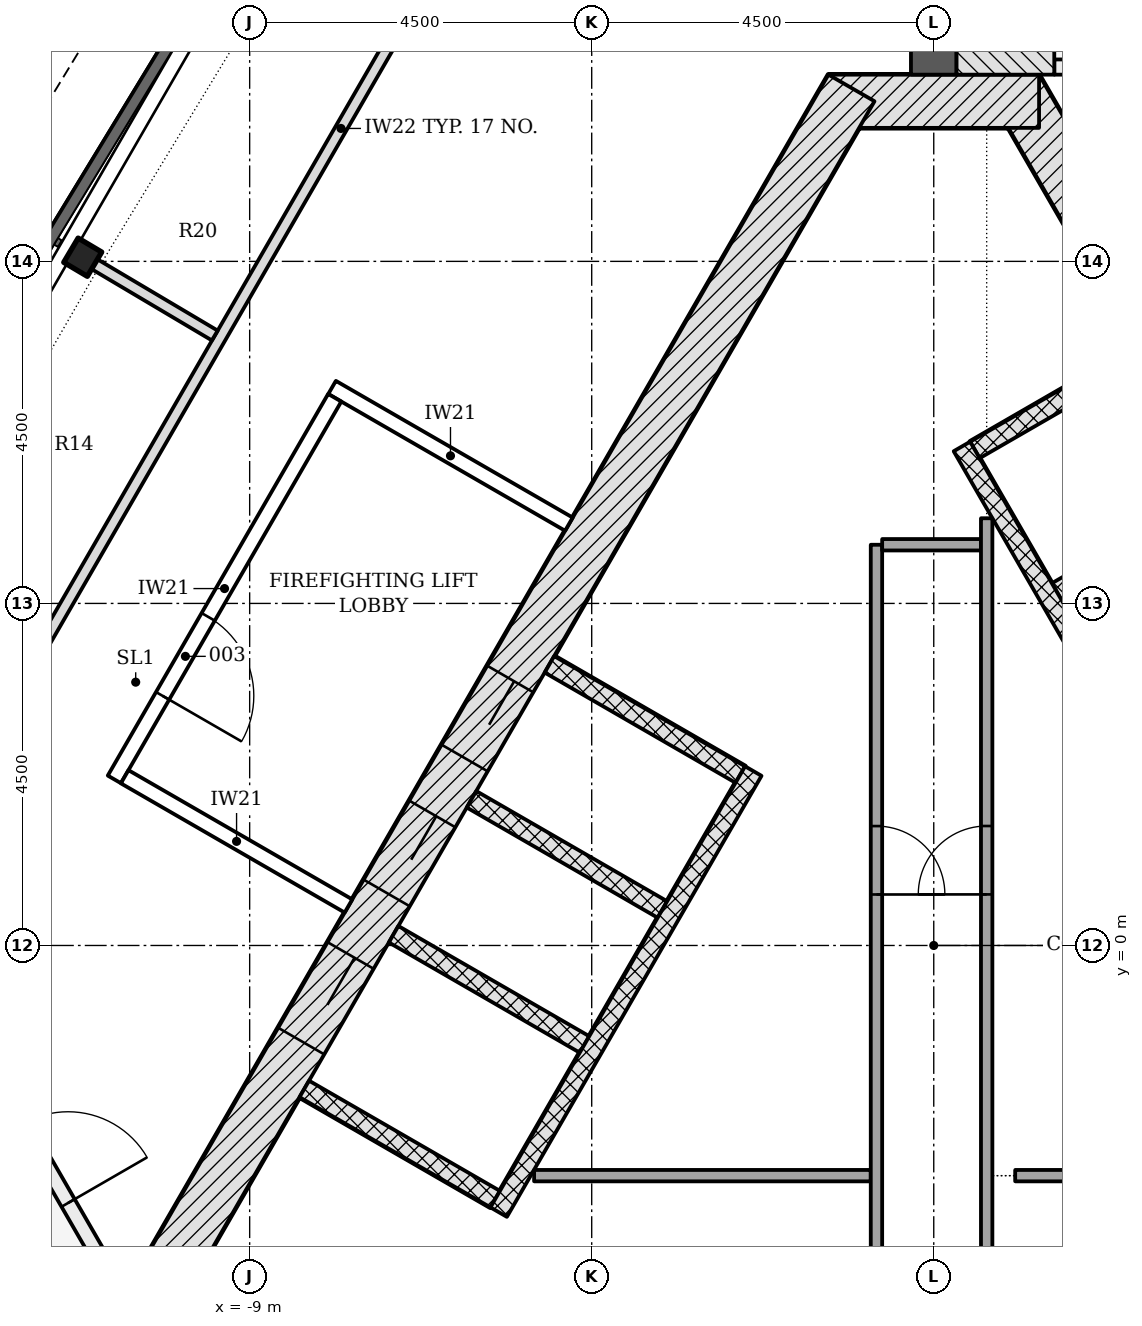
"""IFC4 building model, lengths in metres.
Left out: names, types, materials, properties, quantities, classifications, styles, units other than length and angle.
Written with IfcOpenShell. Run it as: python <this file> out.ifc"""

import sys

from ifc_helpers import new_model, si_unit, direction, frame, frame_2d, origin, origin_2d, place, context, subcontext, project, spatial, polyline, rectangle, i_section, outline, extrude, element, fill, save


model = new_model("IFC4")
c1 = context("Model", 3, precision=1e-05, world=origin(), true_north=direction((0.0, 1.0)))
c2 = subcontext(c1, "Body", "Model", "MODEL_VIEW")
j1 = project(units=[si_unit("LENGTHUNIT", "METRE"), si_unit("PLANEANGLEUNIT", "RADIAN")], contexts=[c1])
p1 = place(None, origin())
s1 = spatial("IfcSite", under=j1, at=p1, CompositionType="ELEMENT")
p2 = place(p1, origin())
s2 = spatial("IfcBuilding", under=s1, at=p2, CompositionType="ELEMENT")
p3 = place(p2, frame((0.0, 0.0, 274.2)))
s3 = spatial("IfcBuildingStorey", under=s2, at=p3, CompositionType="ELEMENT", Elevation=274.2)
p4 = place(p3, frame((10.311, -4.703, -0.2), z_axis=(0.0, 0.0, 1.0), x_axis=(-0.500001446645, 0.866024568562, 0.0)))
e1 = element("IfcWall", 1, at=p4, inside=s3, PredefinedType="SHEAR", context=c2, shape_type="SweptSolid", body=[
    extrude(rectangle(XDim=18.458, YDim=0.7, at=frame_2d((9.229, 0.0))), origin(), (0.0, 0.0, 1.0), 5.35),
])
p5 = place(p4, frame((4.379, 0.0, 0.2)))
e2 = element("IfcOpeningElement", 2, at=p5, cuts=e1, PredefinedType="OPENING", context=c2, shape_type="SweptSolid", body=[
    extrude(rectangle(XDim=1.1, YDim=2.1, at=frame_2d((0.55, 1.05))), frame((0.0, 0.36, 0.0), z_axis=(0.0, -1.0, 0.0), x_axis=(1.0, 0.0, 0.0)), (0.0, 0.0, 1.0), 0.72),
])
p6 = place(p4, frame((6.529, 0.0, 0.2)))
e3 = element("IfcOpeningElement", 3, at=p6, cuts=e1, PredefinedType="OPENING", context=c2, shape_type="SweptSolid", body=[
    extrude(rectangle(XDim=1.1, YDim=2.1, at=frame_2d((0.55, 1.05))), frame((0.0, 0.36, 0.0), z_axis=(0.0, -1.0, 0.0), x_axis=(1.0, 0.0, 0.0)), (0.0, 0.0, 1.0), 0.72),
])
p7 = place(p4, frame((8.679, 0.0, 0.2)))
e4 = element("IfcOpeningElement", 4, at=p7, cuts=e1, PredefinedType="OPENING", context=c2, shape_type="SweptSolid", body=[
    extrude(rectangle(XDim=1.1, YDim=2.1, at=frame_2d((0.55, 1.05))), frame((0.0, 0.36, 0.0), z_axis=(0.0, -1.0, 0.0), x_axis=(1.0, 0.0, 0.0)), (0.0, 0.0, 1.0), 0.72),
])
p8 = place(p4, frame((10.829, 0.0, 0.2)))
e5 = element("IfcOpeningElement", 5, at=p8, cuts=e1, PredefinedType="OPENING", context=c2, shape_type="SweptSolid", body=[
    extrude(rectangle(XDim=1.1, YDim=2.1, at=frame_2d((0.55, 1.05))), frame((0.0, 0.36, 0.0), z_axis=(0.0, -1.0, 0.0), x_axis=(1.0, 0.0, 0.0)), (0.0, 0.0, 1.0), 0.72),
])
p9 = place(p4, frame((12.979, 0.0, 0.2)))
e6 = element("IfcOpeningElement", 6, at=p9, cuts=e1, PredefinedType="OPENING", context=c2, shape_type="SweptSolid", body=[
    extrude(rectangle(XDim=1.1, YDim=2.1, at=frame_2d((0.55, 1.05))), frame((0.0, 0.36, 0.0), z_axis=(0.0, -1.0, 0.0), x_axis=(1.0, 0.0, 0.0)), (0.0, 0.0, 1.0), 0.72),
])
p10 = place(p3, frame((1.386, 11.106, -0.2), z_axis=(0.0, 0.0, 1.0), x_axis=(-1.0, 0.0, 0.0)))
e7 = element("IfcWall", 7, at=p10, inside=s3, PredefinedType="SHEAR", context=c2, shape_type="SweptSolid", body=[
    extrude(rectangle(XDim=2.771, YDim=0.7, at=frame_2d((1.386, 0.0))), origin(), (0.0, 0.0, 1.0), 5.35),
])
p11 = place(p3, frame((-1.083, 11.281, -0.2), z_axis=(0.0, 0.0, 1.0), x_axis=(-0.500001446645, -0.866024568562, 0.0)))
e8 = element("IfcWall", 8, at=p11, inside=s3, PredefinedType="SHEAR", context=c2, shape_type="SweptSolid", body=[
    extrude(rectangle(XDim=18.458, YDim=0.7, at=frame_2d((9.229, 0.0))), origin(), (0.0, 0.0, 1.0), 5.35),
])
p12 = place(p11, frame((8.979, 0.0, 0.2)))
e9 = element("IfcOpeningElement", 9, at=p12, cuts=e8, PredefinedType="OPENING", context=c2, shape_type="SweptSolid", body=[
    extrude(rectangle(XDim=1.2, YDim=2.1, at=frame_2d((0.6, 1.05))), frame((0.0, 0.36, 0.0), z_axis=(0.0, -1.0, 0.0), x_axis=(1.0, 0.0, 0.0)), (0.0, 0.0, 1.0), 0.72),
])
p13 = place(p11, frame((11.029, 0.0, 0.2)))
e10 = element("IfcOpeningElement", 10, at=p13, cuts=e8, PredefinedType="OPENING", context=c2, shape_type="SweptSolid", body=[
    extrude(rectangle(XDim=1.2, YDim=2.1, at=frame_2d((0.6, 1.05))), frame((0.0, 0.36, 0.0), z_axis=(0.0, -1.0, 0.0), x_axis=(1.0, 0.0, 0.0)), (0.0, 0.0, 1.0), 0.72),
])
p14 = place(p11, frame((13.179, 0.0, 0.2)))
e11 = element("IfcOpeningElement", 11, at=p14, cuts=e8, PredefinedType="OPENING", context=c2, shape_type="SweptSolid", body=[
    extrude(rectangle(XDim=1.3, YDim=2.1, at=frame_2d((0.65, 1.05))), frame((0.0, 0.36, 0.0), z_axis=(0.0, -1.0, 0.0), x_axis=(1.0, 0.0, 0.0)), (0.0, 0.0, 1.0), 0.72),
])
p15 = place(p3, frame((0.0, 11.456, -0.2), z_axis=(0.0, 0.0, 1.0), x_axis=(0.0, 1.0, 0.0)))
e12 = element("IfcWall", 12, at=p15, inside=s3, PredefinedType="SHEAR", context=c2, shape_type="SweptSolid", body=[
    extrude(rectangle(XDim=6.679, YDim=0.6, at=frame_2d((3.339, 0.0))), origin(), (0.0, 0.0, 1.0), 5.35),
])
p16 = place(p3, frame((-11.196, 9.055, -0.2), z_axis=(0.0, 0.0, 1.0), x_axis=(-0.51000874803, -0.860169214127, 0.0)))
e13 = element("IfcColumn", 13, at=p16, inside=s3, PredefinedType="COLUMN", context=c2, shape_type="SweptSolid", body=[
    extrude(i_section(OverallWidth=0.371, OverallDepth=0.361, WebThickness=0.012, FlangeThickness=0.02, FilletRadius=0.015, at=origin_2d()), origin(), (0.0, 0.0, 1.0), 5.35),
])
p17 = place(p3, origin())
e14 = element("IfcWall", 14, at=p17, inside=s3, PredefinedType="NOTDEFINED", context=c2, shape_type="SweptSolid", body=[
    extrude(outline(polyline([(-18.145, -2.507), (-19.021, -4.273), (-19.538, -5.703), (-19.733, -7.21), (-19.599, -8.724), (-19.141, -10.174), (-18.381, -11.49), (-17.355, -12.611), (-16.111, -13.485), (-14.708, -14.069), (-13.211, -14.336), (-11.244, -14.46), (-11.225, -14.161), (-13.176, -14.038), (-14.623, -13.779), (-15.965, -13.22), (-17.156, -12.385), (-18.138, -11.312), (-18.865, -10.052), (-19.303, -8.665), (-19.432, -7.216), (-19.244, -5.774), (-18.745, -4.391), (-17.876, -2.64), (-18.145, -2.507)])), origin(), (0.0, 0.0, 1.0), 5.15),
])
p18 = place(p3, origin())
e15 = element("IfcWall", 15, at=p18, inside=s3, PredefinedType="PARAPET", context=c2, shape_type="SweptSolid", body=[
    extrude(outline(polyline([(-5.81, 18.61), (-8.585, 20.051), (-11.451, 21.107), (-14.298, 21.739), (-17.016, 21.922), (-19.5, 21.648), (-21.656, 20.929), (-23.4, 19.792), (-24.665, 18.28), (-25.403, 16.452), (-25.585, 14.378), (-25.205, 12.137), (-24.277, 9.817), (-22.836, 7.505), (-20.938, 5.291), (-18.656, 3.26), (-16.078, 1.49), (-15.937, 1.696), (-18.502, 3.457), (-20.759, 5.467), (-22.634, 7.653), (-24.053, 9.93), (-24.963, 12.205), (-25.333, 14.388), (-25.157, 16.393), (-24.448, 18.15), (-23.232, 19.603), (-21.546, 20.702), (-19.446, 21.403), (-17.01, 21.671), (-14.334, 21.491), (-11.522, 20.867), (-8.687, 19.822), (-5.925, 18.388), (-5.81, 18.61)])), origin(), (0.0, 0.0, 1.0), 1.1),
])
for number, where, z_axis, x_axis in (
    (16, (3.781, 5.907, -0.2), (0.0, 0.0, 1.0), (-0.866, -0.5, 0.0)),
    (17, (2.706, 7.769, -0.2), (0.0, 0.0, 1.0), (-0.866, -0.5, 0.0)),
):
    element("IfcWall", number, at=place(p3, frame(where, z_axis=z_axis, x_axis=x_axis)), inside=s3, PredefinedType="PARTITIONING", context=c2, shape_type="SweptSolid", body=[
        extrude(rectangle(XDim=2.5, YDim=0.25, at=frame_2d((1.25, 0.0))), origin(), (0.0, 0.0, 1.0), 5.35),
    ])
p19 = place(p3, frame((5.87, -2.961, 0.0), z_axis=(0.0, 0.0, 1.0), x_axis=(-0.50000615651, 0.866021849293, 0.0)))
e18 = element("IfcWall", 18, at=p19, inside=s3, PredefinedType="PARTITIONING", context=c2, shape_type="SweptSolid", body=[
    extrude(rectangle(XDim=11.0, YDim=0.25, at=frame_2d((5.5, 0.0))), origin(), (0.0, 0.0, 1.0), 5.15),
])
for number, where, z_axis, x_axis in (
    (19, (-5.056, 3.699, -0.2), (0.0, 0.0, 1.0), (0.866, -0.5, 0.0)),
    (20, (-6.081, 1.923, -0.2), (0.0, 0.0, 1.0), (0.866, -0.5, 0.0)),
    (21, (-7.106, 0.148, -0.2), (0.0, 0.0, 1.0), (0.866, -0.5, 0.0)),
    (22, (-8.281, -1.887, -0.2), (0.0, 0.0, 1.0), (0.866, -0.5, 0.0)),
):
    element("IfcWall", number, at=place(p3, frame(where, z_axis=z_axis, x_axis=x_axis)), inside=s3, PredefinedType="PARTITIONING", context=c2, shape_type="SweptSolid", body=[
        extrude(rectangle(XDim=2.9, YDim=0.25, at=frame_2d((1.45, 0.0))), origin(), (0.0, 0.0, 1.0), 5.35),
    ])
p20 = place(p3, frame((-2.374, 2.294, 0.0), z_axis=(0.0, 0.0, 1.0), x_axis=(-0.500003174267, -0.866023571113, 0.0)))
e23 = element("IfcWall", 23, at=p20, inside=s3, PredefinedType="PARTITIONING", context=c2, shape_type="SweptSolid", body=[
    extrude(rectangle(XDim=6.7, YDim=0.25, at=frame_2d((3.35, 0.0))), origin(), (0.0, 0.0, 1.0), 5.15),
])
p21 = place(p3, frame((-5.258, -3.028, 0.0), z_axis=(0.0, 0.0, 1.0), x_axis=(1.0, 0.0, 0.0)))
e24 = element("IfcWall", 24, at=p21, inside=s3, PredefinedType="PARTITIONING", context=c2, shape_type="SweptSolid", body=[
    extrude(rectangle(XDim=4.429, YDim=0.15, at=frame_2d((2.215, 0.0))), origin(), (0.0, 0.0, 1.0), 5.15),
])
p22 = place(p3, frame((-0.754, 5.272, 0.0), z_axis=(0.0, 0.0, 1.0), x_axis=(0.0, -1.0, 0.0)))
e25 = element("IfcWall", 25, at=p22, inside=s3, PredefinedType="PARTITIONING", context=c2, shape_type="SweptSolid", body=[
    extrude(rectangle(XDim=11.5, YDim=0.15, at=frame_2d((5.75, 0.0))), origin(), (0.0, 0.0, 1.0), 5.15),
])
p23 = place(p22, frame((3.701, 0.0, 0.0)))
e26 = element("IfcOpeningElement", 26, at=p23, cuts=e25, PredefinedType="OPENING", context=c2, shape_type="SweptSolid", body=[
    extrude(rectangle(XDim=0.9, YDim=2.1, at=frame_2d((0.45, 1.05))), frame((0.0, 0.085, 0.0), z_axis=(0.0, -1.0, 0.0), x_axis=(1.0, 0.0, 0.0)), (0.0, 0.0, 1.0), 0.17),
])
p24 = place(p3, frame((-0.679, 5.272, 0.0), z_axis=(0.0, 0.0, 1.0), x_axis=(1.0, 0.0, 0.0)))
e27 = element("IfcWall", 27, at=p24, inside=s3, PredefinedType="PARTITIONING", context=c2, shape_type="SweptSolid", body=[
    extrude(rectangle(XDim=1.3, YDim=0.15, at=frame_2d((0.65, 0.0))), origin(), (0.0, 0.0, 1.0), 5.15),
])
p25 = place(p3, frame((0.696, -5.928, 0.0), z_axis=(0.0, 0.0, 1.0), x_axis=(0.0, 1.0, 0.0)))
e28 = element("IfcWall", 28, at=p25, inside=s3, PredefinedType="PARTITIONING", context=c2, shape_type="SweptSolid", body=[
    extrude(rectangle(XDim=11.549, YDim=0.15, at=frame_2d((5.774, 0.0))), origin(), (0.0, 0.0, 1.0), 5.15),
])
p26 = place(p25, frame((6.6, 0.0, 0.0)))
e29 = element("IfcOpeningElement", 29, at=p26, cuts=e28, PredefinedType="OPENING", context=c2, shape_type="SweptSolid", body=[
    extrude(rectangle(XDim=0.9, YDim=2.1, at=frame_2d((0.45, 1.05))), frame((0.0, 0.085, 0.0), z_axis=(0.0, -1.0, 0.0), x_axis=(1.0, 0.0, 0.0)), (0.0, 0.0, 1.0), 0.17),
])
p27 = place(p3, frame((1.071, -3.028, 0.0), z_axis=(0.0, 0.0, 1.0), x_axis=(1.0, 0.0, 0.0)))
e30 = element("IfcWall", 30, at=p27, inside=s3, PredefinedType="PARTITIONING", context=c2, shape_type="SweptSolid", body=[
    extrude(rectangle(XDim=7.569, YDim=0.15, at=frame_2d((3.784, 0.0))), origin(), (0.0, 0.0, 1.0), 5.15),
])
p28 = place(p3, frame((5.135, 11.556, -0.2), z_axis=(0.0, 0.0, 1.0), x_axis=(-1.0, 0.0, 0.0)))
e31 = element("IfcWall", 31, at=p28, inside=s3, PredefinedType="SHEAR", context=c2, shape_type="SweptSolid", body=[
    extrude(rectangle(XDim=3.55, YDim=0.2, at=frame_2d((1.775, 0.0))), origin(), (0.0, 0.0, 1.0), 5.35),
])
p29 = place(p28, frame((1.175, 0.0, 0.2)))
e32 = element("IfcOpeningElement", 32, at=p29, cuts=e31, PredefinedType="OPENING", context=c2, shape_type="SweptSolid", body=[
    extrude(rectangle(XDim=1.2, YDim=2.1, at=frame_2d((0.6, 1.05))), frame((0.0, 0.11, 0.0), z_axis=(0.0, -1.0, 0.0), x_axis=(1.0, 0.0, 0.0)), (0.0, 0.0, 1.0), 0.22),
])
p30 = place(p3, frame((0.943, 11.456, -0.2), z_axis=(0.0, 0.0, 1.0), x_axis=(0.0, 1.0, 0.0)))
e33 = element("IfcWall", 33, at=p30, inside=s3, PredefinedType="SHEAR", context=c2, shape_type="SweptSolid", body=[
    extrude(rectangle(XDim=6.679, YDim=1.286, at=frame_2d((3.339, 0.0))), origin(), (0.0, 0.0, 1.0), 5.35),
])
p31 = place(p3, frame((-12.576, -1.331, -0.2), z_axis=(0.0, 0.0, 1.0), x_axis=(0.499970499736, -0.8660424351, 0.0)))
e34 = element("IfcWall", 34, at=p31, inside=s3, PredefinedType="SHEAR", context=c2, shape_type="SweptSolid", body=[
    extrude(rectangle(XDim=3.55, YDim=0.2, at=frame_2d((1.775, 0.0))), origin(), (0.0, 0.0, 1.0), 5.35),
])
p32 = place(p31, frame((1.175, 0.0, 0.2)))
e35 = element("IfcOpeningElement", 35, at=p32, cuts=e34, PredefinedType="OPENING", context=c2, shape_type="SweptSolid", body=[
    extrude(rectangle(XDim=1.2, YDim=2.1, at=frame_2d((0.6, 1.05))), frame((0.0, 0.11, 0.0), z_axis=(0.0, -1.0, 0.0), x_axis=(1.0, 0.0, 0.0)), (0.0, 0.0, 1.0), 0.22),
])
p33 = place(p3, frame((-4.8, 5.542, 0.0), z_axis=(0.0, 0.0, 1.0), x_axis=(-0.866017220491, 0.500014173611, 0.0)))
e36 = element("IfcWall", 36, at=p33, inside=s3, PredefinedType="PARTITIONING", context=c2, shape_type="SweptSolid", body=[
    extrude(rectangle(XDim=3.598, YDim=0.2, at=frame_2d((1.799, 0.0))), origin(), (0.0, 0.0, 1.0), 5.15),
])
p34 = place(p3, frame((-7.881, 7.206, 0.0), z_axis=(0.0, 0.0, 1.0), x_axis=(-0.499988536525, -0.866032022124, 0.0)))
e37 = element("IfcWall", 37, at=p34, inside=s3, PredefinedType="PARTITIONING", context=c2, shape_type="SweptSolid", body=[
    extrude(rectangle(XDim=5.798, YDim=0.2, at=frame_2d((2.899, 0.0))), origin(), (0.0, 0.0, 1.0), 4.602),
])
p35 = place(p34, frame((3.329, 0.0, 0.0)))
e38 = element("IfcOpeningElement", 38, at=p35, cuts=e37, PredefinedType="OPENING", context=c2, shape_type="SweptSolid", body=[
    extrude(rectangle(XDim=1.2, YDim=2.1, at=frame_2d((0.6, 1.05))), frame((0.0, 0.11, 0.0), z_axis=(0.0, -1.0, 0.0), x_axis=(1.0, 0.0, 0.0)), (0.0, 0.0, 1.0), 0.22),
])
p36 = place(p3, frame((-10.645, 2.219, 0.0), z_axis=(0.0, 0.0, 1.0), x_axis=(0.866038511948, -0.499977295307, 0.0)))
e39 = element("IfcWall", 39, at=p36, inside=s3, PredefinedType="PARTITIONING", context=c2, shape_type="SweptSolid", body=[
    extrude(rectangle(XDim=3.4, YDim=0.2, at=frame_2d((1.7, 0.0))), origin(), (0.0, 0.0, 1.0), 5.15),
])
p37 = place(p3, frame((-13.457, 0.949, 0.0), z_axis=(0.0, 0.0, 1.0), x_axis=(0.500001340499, 0.866024629845, 0.0)))
e40 = element("IfcWall", 40, at=p37, inside=s3, PredefinedType="PARTITIONING", context=c2, shape_type="SweptSolid", body=[
    extrude(rectangle(XDim=22.632, YDim=0.15, at=frame_2d((11.316, 0.0))), origin(), (0.0, 0.0, 1.0), 4.602),
])
p38 = place(p37, frame((14.943, 0.0, 0.0)))
e41 = element("IfcOpeningElement", 41, at=p38, cuts=e40, PredefinedType="OPENING", context=c2, shape_type="SweptSolid", body=[
    extrude(rectangle(XDim=1.0, YDim=2.1, at=frame_2d((0.5, 1.05))), frame((0.0, 0.085, 0.0), z_axis=(0.0, -1.0, 0.0), x_axis=(1.0, 0.0, 0.0)), (0.0, 0.0, 1.0), 0.17),
])
p39 = place(p37, frame((0.329, 0.0, 0.0)))
e42 = element("IfcOpeningElement", 42, at=p39, cuts=e40, PredefinedType="OPENING", context=c2, shape_type="SweptSolid", body=[
    extrude(rectangle(XDim=1.0, YDim=2.1, at=frame_2d((0.5, 1.05))), frame((0.0, 0.085, 0.0), z_axis=(0.0, -1.0, 0.0), x_axis=(1.0, 0.0, 0.0)), (0.0, 0.0, 1.0), 0.17),
])
p40 = place(p3, frame((-11.046, 8.966, 0.0), z_axis=(0.0, 0.0, 1.0), x_axis=(0.860132404911, -0.510070824516, 0.0)))
e43 = element("IfcWall", 43, at=p40, inside=s3, PredefinedType="PARTITIONING", context=c2, shape_type="SweptSolid", body=[
    extrude(rectangle(XDim=1.845, YDim=0.15, at=frame_2d((0.922, 0.0))), origin(), (0.0, 0.0, 1.0), 4.602),
])
p41 = place(p12, origin())
e44 = element("IfcDoor", 44, at=p41, inside=s3, OperationType="DOUBLE_DOOR_SLIDING", PredefinedType="DOOR", context=c2, shape_type="SweptSolid", body=[
    extrude(rectangle(XDim=1.2, YDim=2.1, at=frame_2d((0.6, 1.05))), frame((0.0, 0.025, 0.0), z_axis=(0.0, -1.0, 0.0), x_axis=(1.0, 0.0, 0.0)), (0.0, 0.0, 1.0), 0.05),
])
fill(e9, e44)
p42 = place(p13, origin())
e45 = element("IfcDoor", 45, at=p42, inside=s3, OperationType="DOUBLE_DOOR_SLIDING", PredefinedType="DOOR", context=c2, shape_type="SweptSolid", body=[
    extrude(rectangle(XDim=1.2, YDim=2.1, at=frame_2d((0.6, 1.05))), frame((0.0, 0.025, 0.0), z_axis=(0.0, -1.0, 0.0), x_axis=(1.0, 0.0, 0.0)), (0.0, 0.0, 1.0), 0.05),
])
fill(e10, e45)
p43 = place(p14, origin())
e46 = element("IfcDoor", 46, at=p43, inside=s3, OperationType="DOUBLE_DOOR_SLIDING", PredefinedType="DOOR", context=c2, shape_type="SweptSolid", body=[
    extrude(rectangle(XDim=1.3, YDim=2.1, at=frame_2d((0.65, 1.05))), frame((0.0, 0.025, 0.0), z_axis=(0.0, -1.0, 0.0), x_axis=(1.0, 0.0, 0.0)), (0.0, 0.0, 1.0), 0.05),
])
fill(e11, e46)
p44 = place(p23, origin())
e47 = element("IfcDoor", 47, at=p44, inside=s3, OperationType="SINGLE_SWING_RIGHT", PredefinedType="DOOR", context=c2, shape_type="SweptSolid", body=[
    extrude(rectangle(XDim=0.9, YDim=2.1, at=frame_2d((0.45, 1.05))), frame((0.0, 0.025, 0.0), z_axis=(0.0, -1.0, 0.0), x_axis=(1.0, 0.0, 0.0)), (0.0, 0.0, 1.0), 0.05),
])
fill(e26, e47)
p45 = place(p26, origin())
e48 = element("IfcDoor", 48, at=p45, inside=s3, OperationType="SINGLE_SWING_LEFT", PredefinedType="DOOR", context=c2, shape_type="SweptSolid", body=[
    extrude(rectangle(XDim=0.9, YDim=2.1, at=frame_2d((0.45, 1.05))), frame((0.0, 0.025, 0.0), z_axis=(0.0, -1.0, 0.0), x_axis=(1.0, 0.0, 0.0)), (0.0, 0.0, 1.0), 0.05),
])
fill(e29, e48)
p46 = place(p32, origin())
e49 = element("IfcDoor", 49, at=p46, inside=s3, OperationType="SINGLE_SWING_RIGHT", PredefinedType="DOOR", context=c2, shape_type="SweptSolid", body=[
    extrude(rectangle(XDim=1.2, YDim=2.1, at=frame_2d((0.6, 1.05))), frame((0.0, 0.025, 0.0), z_axis=(0.0, -1.0, 0.0), x_axis=(1.0, 0.0, 0.0)), (0.0, 0.0, 1.0), 0.05),
])
fill(e35, e49)
p47 = place(p35, origin())
e50 = element("IfcDoor", 50, at=p47, inside=s3, OperationType="SINGLE_SWING_RIGHT", PredefinedType="DOOR", context=c2, shape_type="SweptSolid", body=[
    extrude(rectangle(XDim=1.2, YDim=2.1, at=frame_2d((0.6, 1.05))), frame((0.0, 0.025, 0.0), z_axis=(0.0, -1.0, 0.0), x_axis=(1.0, 0.0, 0.0)), (0.0, 0.0, 1.0), 0.05),
])
fill(e38, e50)
save(model, sys.argv[1])
